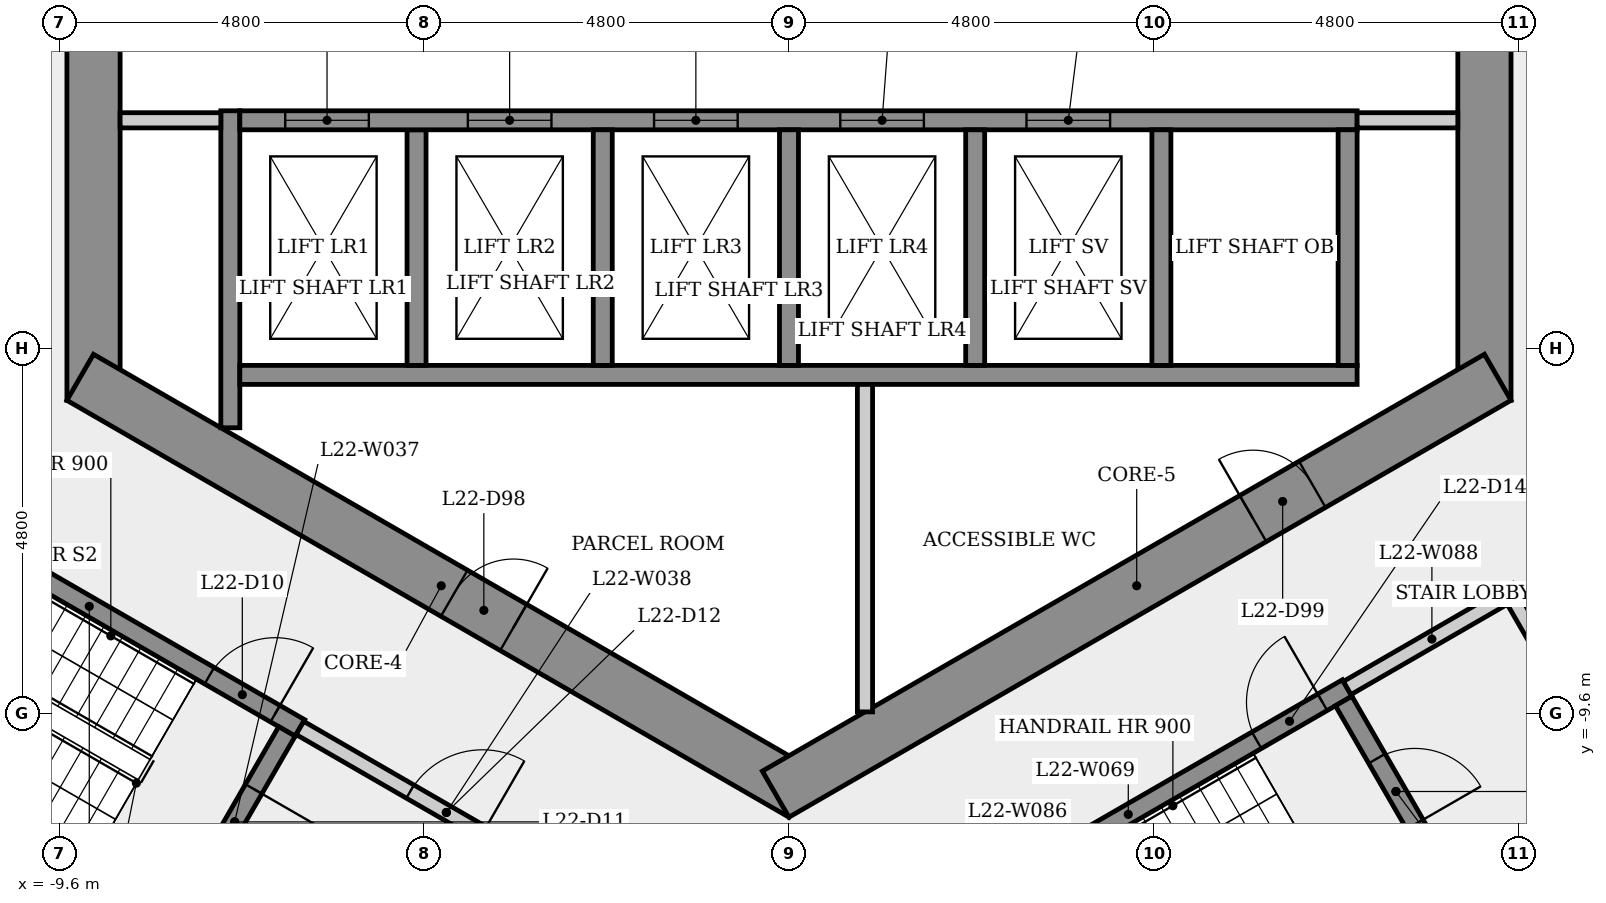
"""IFC4 building model, lengths in metres.
Left out: names, types, materials, properties, quantities, classifications, styles, units other than length and angle.
Written with IfcOpenShell. Run it as: python <this file> out.ifc"""

import sys

from ifc_helpers import new_model, si_unit, direction, frame, frame_2d, origin, place, context, subcontext, project, spatial, rectangle, extrude, element, fill, save


model = new_model("IFC4")
c1 = context("Model", 3, precision=1e-05, world=origin(), true_north=direction((0.0, 1.0)))
c2 = subcontext(c1, "Body", "Model", "MODEL_VIEW")
j1 = project(units=[si_unit("LENGTHUNIT", "METRE"), si_unit("PLANEANGLEUNIT", "RADIAN")], contexts=[c1])
p1 = place(None, origin())
s1 = spatial("IfcSite", under=j1, at=p1, CompositionType="ELEMENT")
p2 = place(p1, origin())
s2 = spatial("IfcBuilding", under=s1, at=p2, CompositionType="ELEMENT")
p3 = place(p2, frame((0.0, 0.0, 86.5)))
s3 = spatial("IfcBuildingStorey", under=s2, at=p3, CompositionType="ELEMENT", Elevation=86.5)
p4 = place(p3, frame((9.15, -5.485, 0.0), z_axis=(0.0, 0.0, 1.0), x_axis=(0.0, 1.0, 0.0)))
e1 = element("IfcWall", 1, at=p4, inside=s3, PredefinedType="SHEAR", context=c2, shape_type="SweptSolid", body=[
    extrude(rectangle(XDim=10.97, YDim=0.7, at=frame_2d((5.485, 0.0))), origin(), (0.0, 0.0, 1.0), 3.4),
])
p5 = place(p4, frame((4.685, 0.0, 0.0)))
e2 = element("IfcOpeningElement", 2, at=p5, cuts=e1, PredefinedType="OPENING", context=c2, shape_type="SweptSolid", body=[
    extrude(rectangle(XDim=1.6, YDim=2.1, at=frame_2d((0.8, 1.05))), frame((0.0, 0.36, 0.0), z_axis=(0.0, -1.0, 0.0), x_axis=(1.0, 0.0, 0.0)), (0.0, 0.0, 1.0), 0.72),
])
p6 = place(p3, frame((-9.15, 5.485, 0.0), z_axis=(0.0, 0.0, 1.0), x_axis=(0.0, -1.0, 0.0)))
e3 = element("IfcWall", 3, at=p6, inside=s3, PredefinedType="SHEAR", context=c2, shape_type="SweptSolid", body=[
    extrude(rectangle(XDim=10.97, YDim=0.7, at=frame_2d((5.485, 0.0))), origin(), (0.0, 0.0, 1.0), 3.4),
])
p7 = place(p6, frame((4.685, 0.0, 0.0)))
e4 = element("IfcOpeningElement", 4, at=p7, cuts=e3, PredefinedType="OPENING", context=c2, shape_type="SweptSolid", body=[
    extrude(rectangle(XDim=1.6, YDim=2.1, at=frame_2d((0.8, 1.05))), frame((0.0, 0.36, 0.0), z_axis=(0.0, -1.0, 0.0), x_axis=(1.0, 0.0, 0.0)), (0.0, 0.0, 1.0), 0.72),
])
p8 = place(p3, frame((-9.325, -5.182, 0.0), z_axis=(0.0, 0.0, 1.0), x_axis=(0.866023993627, -0.500002442456, 0.0)))
e5 = element("IfcWall", 5, at=p8, inside=s3, PredefinedType="SHEAR", context=c2, shape_type="SweptSolid", body=[
    extrude(rectangle(XDim=10.97, YDim=0.7, at=frame_2d((5.485, 0.0))), origin(), (0.0, 0.0, 1.0), 3.4),
])
p9 = place(p8, frame((5.682, 0.0, 0.0)))
e6 = element("IfcOpeningElement", 6, at=p9, cuts=e5, PredefinedType="OPENING", context=c2, shape_type="SweptSolid", body=[
    extrude(rectangle(XDim=0.9, YDim=2.1, at=frame_2d((0.45, 1.05))), frame((0.0, 0.36, 0.0), z_axis=(0.0, -1.0, 0.0), x_axis=(1.0, 0.0, 0.0)), (0.0, 0.0, 1.0), 0.72),
])
p10 = place(p3, frame((-0.175, -10.667, 0.0), z_axis=(0.0, 0.0, 1.0), x_axis=(0.866023993627, 0.500002442456, 0.0)))
e7 = element("IfcWall", 7, at=p10, inside=s3, PredefinedType="SHEAR", context=c2, shape_type="SweptSolid", body=[
    extrude(rectangle(XDim=10.97, YDim=0.7, at=frame_2d((5.485, 0.0))), origin(), (0.0, 0.0, 1.0), 3.4),
])
p11 = place(p10, frame((7.252, 0.0, 0.0)))
e8 = element("IfcOpeningElement", 8, at=p11, cuts=e7, PredefinedType="OPENING", context=c2, shape_type="SweptSolid", body=[
    extrude(rectangle(XDim=0.9, YDim=2.1, at=frame_2d((0.45, 1.05))), frame((0.0, 0.36, 0.0), z_axis=(0.0, -1.0, 0.0), x_axis=(1.0, 0.0, 0.0)), (0.0, 0.0, 1.0), 0.72),
])
p12 = place(p3, frame((-11.977, -6.595, 0.0), z_axis=(0.0, 0.0, 1.0), x_axis=(0.866025499775, -0.499999833739, 0.0)))
e9 = element("IfcWall", 9, at=p12, inside=s3, PredefinedType="SHEAR", context=c2, shape_type="SweptSolid", body=[
    extrude(rectangle(XDim=6.4, YDim=0.25, at=frame_2d((3.2, 0.0))), origin(), (0.0, 0.0, 1.0), 3.05),
])
p13 = place(p12, frame((5.025, 0.0, 0.0)))
e10 = element("IfcOpeningElement", 10, at=p13, cuts=e9, PredefinedType="OPENING", context=c2, shape_type="SweptSolid", body=[
    extrude(rectangle(XDim=1.0, YDim=2.1, at=frame_2d((0.5, 1.05))), frame((0.0, 0.135, 0.0), z_axis=(0.0, -1.0, 0.0), x_axis=(1.0, 0.0, 0.0)), (0.0, 0.0, 1.0), 0.27),
])
p14 = place(p3, frame((-7.935, -12.393, 0.0), z_axis=(0.0, 0.0, 1.0), x_axis=(-0.866025499775, 0.499999833739, 0.0)))
e11 = element("IfcWall", 11, at=p14, inside=s3, PredefinedType="SHEAR", context=c2, shape_type="SweptSolid", body=[
    extrude(rectangle(XDim=6.4, YDim=0.25, at=frame_2d((3.2, 0.0))), origin(), (0.0, 0.0, 1.0), 3.05),
])
p15 = place(p3, frame((-7.35, -5.846, 0.0), z_axis=(0.0, 0.0, 1.0), x_axis=(0.0, 1.0, 0.0)))
e12 = element("IfcWall", 12, at=p15, inside=s3, PredefinedType="SHEAR", context=c2, shape_type="SweptSolid", body=[
    extrude(rectangle(XDim=4.171, YDim=0.25, at=frame_2d((2.085, 0.0))), origin(), (0.0, 0.0, 1.0), 3.05),
])
p16 = place(p3, frame((-7.475, -1.8, 0.0), z_axis=(0.0, 0.0, 1.0), x_axis=(-1.0, 0.0, 0.0)))
e13 = element("IfcWall", 13, at=p16, inside=s3, PredefinedType="PARTITIONING", context=c2, shape_type="SweptSolid", body=[
    extrude(rectangle(XDim=1.325, YDim=0.2, at=frame_2d((0.663, 0.0))), origin(), (0.0, 0.0, 1.0), 3.05),
])
p17 = place(p3, frame((-6.605, -9.841, 0.0), z_axis=(0.0, 0.0, 1.0), x_axis=(-0.499996545922, -0.866027397988, 0.0)))
e14 = element("IfcWall", 14, at=p17, inside=s3, PredefinedType="SHEAR", context=c2, shape_type="SweptSolid", body=[
    extrude(rectangle(XDim=2.75, YDim=0.25, at=frame_2d((1.375, 0.0))), origin(), (0.0, 0.0, 1.0), 3.05),
])
p18 = place(p17, frame((0.875, 0.0, 0.0)))
e15 = element("IfcOpeningElement", 15, at=p18, cuts=e14, PredefinedType="OPENING", context=c2, shape_type="SweptSolid", body=[
    extrude(rectangle(XDim=1.0, YDim=2.1, at=frame_2d((0.5, 1.05))), frame((0.0, 0.135, 0.0), z_axis=(0.0, -1.0, 0.0), x_axis=(1.0, 0.0, 0.0)), (0.0, 0.0, 1.0), 0.27),
])
p19 = place(p3, frame((-6.435, -9.795, 0.0), z_axis=(0.0, 0.0, 1.0), x_axis=(0.866012907634, -0.500021643343, 0.0)))
e16 = element("IfcWall", 16, at=p19, inside=s3, PredefinedType="PARTITIONING", context=c2, shape_type="SweptSolid", body=[
    extrude(rectangle(XDim=4.45, YDim=0.2, at=frame_2d((2.225, 0.0))), origin(), (0.0, 0.0, 1.0), 3.05),
])
p20 = place(p19, frame((1.675, 0.0, 0.0)))
e17 = element("IfcOpeningElement", 17, at=p20, cuts=e16, PredefinedType="OPENING", context=c2, shape_type="SweptSolid", body=[
    extrude(rectangle(XDim=1.1, YDim=2.1, at=frame_2d((0.55, 1.05))), frame((0.0, 0.11, 0.0), z_axis=(0.0, -1.0, 0.0), x_axis=(1.0, 0.0, 0.0)), (0.0, 0.0, 1.0), 0.22),
])
p21 = place(p3, frame((-7.225, -5.15, 0.0), z_axis=(0.0, 0.0, 1.0), x_axis=(1.0, 0.0, 0.0)))
e18 = element("IfcWall", 18, at=p21, inside=s3, PredefinedType="SHEAR", context=c2, shape_type="SweptSolid", body=[
    extrude(rectangle(XDim=14.7, YDim=0.25, at=frame_2d((7.35, 0.0))), origin(), (0.0, 0.0, 1.0), 3.05),
])
p22 = place(p3, frame((-4.9, -1.925, 0.0), z_axis=(0.0, 0.0, 1.0), x_axis=(0.0, -1.0, 0.0)))
e19 = element("IfcWall", 19, at=p22, inside=s3, PredefinedType="SHEAR", context=c2, shape_type="SweptSolid", body=[
    extrude(rectangle(XDim=3.1, YDim=0.25, at=frame_2d((1.55, 0.0))), origin(), (0.0, 0.0, 1.0), 3.4),
])
p23 = place(p3, frame((-7.225, -1.8, 0.0), z_axis=(0.0, 0.0, 1.0), x_axis=(1.0, 0.0, 0.0)))
e20 = element("IfcWall", 20, at=p23, inside=s3, PredefinedType="SHEAR", context=c2, shape_type="SweptSolid", body=[
    extrude(rectangle(XDim=14.7, YDim=0.25, at=frame_2d((7.35, 0.0))), origin(), (0.0, 0.0, 1.0), 3.05),
])
p24 = place(p23, frame((0.597, 0.0, 0.0)))
e21 = element("IfcOpeningElement", 21, at=p24, cuts=e20, PredefinedType="OPENING", context=c2, shape_type="SweptSolid", body=[
    extrude(rectangle(XDim=1.1, YDim=2.1, at=frame_2d((0.55, 1.05))), frame((0.0, 0.135, 0.0), z_axis=(0.0, -1.0, 0.0), x_axis=(1.0, 0.0, 0.0)), (0.0, 0.0, 1.0), 0.27),
])
p25 = place(p23, frame((3.0, 0.0, 0.0)))
e22 = element("IfcOpeningElement", 22, at=p25, cuts=e20, PredefinedType="OPENING", context=c2, shape_type="SweptSolid", body=[
    extrude(rectangle(XDim=1.1, YDim=2.1, at=frame_2d((0.55, 1.05))), frame((0.0, 0.135, 0.0), z_axis=(0.0, -1.0, 0.0), x_axis=(1.0, 0.0, 0.0)), (0.0, 0.0, 1.0), 0.27),
])
p26 = place(p23, frame((5.45, 0.0, 0.0)))
e23 = element("IfcOpeningElement", 23, at=p26, cuts=e20, PredefinedType="OPENING", context=c2, shape_type="SweptSolid", body=[
    extrude(rectangle(XDim=1.1, YDim=2.1, at=frame_2d((0.55, 1.05))), frame((0.0, 0.135, 0.0), z_axis=(0.0, -1.0, 0.0), x_axis=(1.0, 0.0, 0.0)), (0.0, 0.0, 1.0), 0.27),
])
p27 = place(p23, frame((7.9, 0.0, 0.0)))
e24 = element("IfcOpeningElement", 24, at=p27, cuts=e20, PredefinedType="OPENING", context=c2, shape_type="SweptSolid", body=[
    extrude(rectangle(XDim=1.1, YDim=2.1, at=frame_2d((0.55, 1.05))), frame((0.0, 0.135, 0.0), z_axis=(0.0, -1.0, 0.0), x_axis=(1.0, 0.0, 0.0)), (0.0, 0.0, 1.0), 0.27),
])
p28 = place(p23, frame((10.35, 0.0, 0.0)))
e25 = element("IfcOpeningElement", 25, at=p28, cuts=e20, PredefinedType="OPENING", context=c2, shape_type="SweptSolid", body=[
    extrude(rectangle(XDim=1.1, YDim=2.1, at=frame_2d((0.55, 1.05))), frame((0.0, 0.135, 0.0), z_axis=(0.0, -1.0, 0.0), x_axis=(1.0, 0.0, 0.0)), (0.0, 0.0, 1.0), 0.27),
])
for number, where, z_axis, x_axis in (
    (26, (-2.45, -1.925, 0.0), (0.0, 0.0, 1.0), (0.0, -1.0, 0.0)),
    (27, (0.0, -1.925, 0.0), (0.0, 0.0, 1.0), (0.0, -1.0, 0.0)),
):
    element("IfcWall", number, at=place(p3, frame(where, z_axis=z_axis, x_axis=x_axis)), inside=s3, PredefinedType="SHEAR", context=c2, shape_type="SweptSolid", body=[
        extrude(rectangle(XDim=3.1, YDim=0.25, at=frame_2d((1.55, 0.0))), origin(), (0.0, 0.0, 1.0), 3.4),
    ])
p29 = place(p3, frame((1.0, -5.275, 0.0), z_axis=(0.0, 0.0, 1.0), x_axis=(0.0, -1.0, 0.0)))
e28 = element("IfcWall", 28, at=p29, inside=s3, PredefinedType="PARTITIONING", context=c2, shape_type="SweptSolid", body=[
    extrude(rectangle(XDim=4.309, YDim=0.2, at=frame_2d((2.155, 0.0))), origin(), (0.0, 0.0, 1.0), 3.05),
])
p30 = place(p3, frame((1.585, -12.595, 0.0), z_axis=(0.0, 0.0, 1.0), x_axis=(0.866036417653, 0.499980922934, 0.0)))
e29 = element("IfcWall", 29, at=p30, inside=s3, PredefinedType="SHEAR", context=c2, shape_type="SweptSolid", body=[
    extrude(rectangle(XDim=6.65, YDim=0.25, at=frame_2d((3.325, 0.0))), origin(), (0.0, 0.0, 1.0), 3.05),
])
p31 = place(p30, frame((5.275, 0.0, 0.0)))
e30 = element("IfcOpeningElement", 30, at=p31, cuts=e29, PredefinedType="OPENING", context=c2, shape_type="SweptSolid", body=[
    extrude(rectangle(XDim=1.0, YDim=2.1, at=frame_2d((0.5, 1.05))), frame((0.0, 0.135, 0.0), z_axis=(0.0, -1.0, 0.0), x_axis=(1.0, 0.0, 0.0)), (0.0, 0.0, 1.0), 0.27),
])
for number, where, z_axis, x_axis in (
    (31, (2.45, -1.925, 0.0), (0.0, 0.0, 1.0), (0.0, -1.0, 0.0)),
    (32, (4.9, -1.925, 0.0), (0.0, 0.0, 1.0), (0.0, -1.0, 0.0)),
):
    element("IfcWall", number, at=place(p3, frame(where, z_axis=z_axis, x_axis=x_axis)), inside=s3, PredefinedType="SHEAR", context=c2, shape_type="SweptSolid", body=[
        extrude(rectangle(XDim=3.1, YDim=0.25, at=frame_2d((1.55, 0.0))), origin(), (0.0, 0.0, 1.0), 3.4),
    ])
p32 = place(p3, frame((7.298, -9.441, 0.0), z_axis=(0.0, 0.0, 1.0), x_axis=(0.500034990121, -0.866005201286, 0.0)))
e33 = element("IfcWall", 33, at=p32, inside=s3, PredefinedType="SHEAR", context=c2, shape_type="SweptSolid", body=[
    extrude(rectangle(XDim=2.75, YDim=0.25, at=frame_2d((1.375, 0.0))), origin(), (0.0, 0.0, 1.0), 3.05),
])
p33 = place(p32, frame((0.875, 0.0, 0.0)))
e34 = element("IfcOpeningElement", 34, at=p33, cuts=e33, PredefinedType="OPENING", context=c2, shape_type="SweptSolid", body=[
    extrude(rectangle(XDim=1.0, YDim=2.1, at=frame_2d((0.5, 1.05))), frame((0.0, 0.135, 0.0), z_axis=(0.0, -1.0, 0.0), x_axis=(1.0, 0.0, 0.0)), (0.0, 0.0, 1.0), 0.27),
])
p34 = place(p3, frame((7.344, -9.27, 0.0), z_axis=(0.0, 0.0, 1.0), x_axis=(0.866005588531, 0.500034319456, 0.0)))
e35 = element("IfcWall", 35, at=p34, inside=s3, PredefinedType="PARTITIONING", context=c2, shape_type="SweptSolid", body=[
    extrude(rectangle(XDim=2.575, YDim=0.2, at=frame_2d((1.288, 0.0))), origin(), (0.0, 0.0, 1.0), 3.05),
])
p35 = place(p3, frame((7.35, -1.925, 0.0), z_axis=(0.0, 0.0, 1.0), x_axis=(0.0, -1.0, 0.0)))
e36 = element("IfcWall", 36, at=p35, inside=s3, PredefinedType="SHEAR", context=c2, shape_type="SweptSolid", body=[
    extrude(rectangle(XDim=3.1, YDim=0.25, at=frame_2d((1.55, 0.0))), origin(), (0.0, 0.0, 1.0), 3.4),
])
p36 = place(p3, frame((8.8, -1.8, 0.0), z_axis=(0.0, 0.0, 1.0), x_axis=(-1.0, 0.0, 0.0)))
e37 = element("IfcWall", 37, at=p36, inside=s3, PredefinedType="PARTITIONING", context=c2, shape_type="SweptSolid", body=[
    extrude(rectangle(XDim=1.325, YDim=0.2, at=frame_2d((0.663, 0.0))), origin(), (0.0, 0.0, 1.0), 3.05),
])
p37 = place(p3, frame((9.537, -8.119, 0.0), z_axis=(0.0, 0.0, 1.0), x_axis=(0.499990139034, -0.866031096941, 0.0)))
e38 = element("IfcWall", 38, at=p37, inside=s3, PredefinedType="PARTITIONING", context=c2, shape_type="SweptSolid", body=[
    extrude(rectangle(XDim=3.0, YDim=0.2, at=frame_2d((1.5, 0.0))), origin(), (0.0, 0.0, 1.0), 3.05),
])
p38 = place(p37, frame((0.935, 0.0, 0.0)))
e39 = element("IfcOpeningElement", 39, at=p38, cuts=e38, PredefinedType="OPENING", context=c2, shape_type="SweptSolid", body=[
    extrude(rectangle(XDim=1.0, YDim=2.1, at=frame_2d((0.5, 1.05))), frame((0.0, 0.11, 0.0), z_axis=(0.0, -1.0, 0.0), x_axis=(1.0, 0.0, 0.0)), (0.0, 0.0, 1.0), 0.22),
])
p39 = place(p3, frame((10.901, -10.681, 0.0), z_axis=(0.0, 0.0, 1.0), x_axis=(-0.866007538022, -0.500030943131, 0.0)))
e40 = element("IfcWall", 40, at=p39, inside=s3, PredefinedType="PARTITIONING", context=c2, shape_type="SweptSolid", body=[
    extrude(rectangle(XDim=2.375, YDim=0.2, at=frame_2d((1.188, 0.0))), origin(), (0.0, 0.0, 1.0), 3.05),
])
p40 = place(p24, origin())
e41 = element("IfcDoor", 41, at=p40, inside=s3, OperationType="SLIDING_TO_LEFT", PredefinedType="DOOR", context=c2, shape_type="SweptSolid", body=[
    extrude(rectangle(XDim=1.1, YDim=2.1, at=frame_2d((0.55, 1.05))), frame((0.0, 0.025, 0.0), z_axis=(0.0, -1.0, 0.0), x_axis=(1.0, 0.0, 0.0)), (0.0, 0.0, 1.0), 0.05),
])
fill(e21, e41)
p41 = place(p25, origin())
e42 = element("IfcDoor", 42, at=p41, inside=s3, OperationType="SLIDING_TO_LEFT", PredefinedType="DOOR", context=c2, shape_type="SweptSolid", body=[
    extrude(rectangle(XDim=1.1, YDim=2.1, at=frame_2d((0.55, 1.05))), frame((0.0, 0.025, 0.0), z_axis=(0.0, -1.0, 0.0), x_axis=(1.0, 0.0, 0.0)), (0.0, 0.0, 1.0), 0.05),
])
fill(e22, e42)
p42 = place(p26, origin())
e43 = element("IfcDoor", 43, at=p42, inside=s3, OperationType="SLIDING_TO_LEFT", PredefinedType="DOOR", context=c2, shape_type="SweptSolid", body=[
    extrude(rectangle(XDim=1.1, YDim=2.1, at=frame_2d((0.55, 1.05))), frame((0.0, 0.025, 0.0), z_axis=(0.0, -1.0, 0.0), x_axis=(1.0, 0.0, 0.0)), (0.0, 0.0, 1.0), 0.05),
])
fill(e23, e43)
p43 = place(p27, origin())
e44 = element("IfcDoor", 44, at=p43, inside=s3, OperationType="SLIDING_TO_LEFT", PredefinedType="DOOR", context=c2, shape_type="SweptSolid", body=[
    extrude(rectangle(XDim=1.1, YDim=2.1, at=frame_2d((0.55, 1.05))), frame((0.0, 0.025, 0.0), z_axis=(0.0, -1.0, 0.0), x_axis=(1.0, 0.0, 0.0)), (0.0, 0.0, 1.0), 0.05),
])
fill(e24, e44)
p44 = place(p28, origin())
e45 = element("IfcDoor", 45, at=p44, inside=s3, OperationType="SLIDING_TO_LEFT", PredefinedType="DOOR", context=c2, shape_type="SweptSolid", body=[
    extrude(rectangle(XDim=1.1, YDim=2.1, at=frame_2d((0.55, 1.05))), frame((0.0, 0.025, 0.0), z_axis=(0.0, -1.0, 0.0), x_axis=(1.0, 0.0, 0.0)), (0.0, 0.0, 1.0), 0.05),
])
fill(e25, e45)
p45 = place(p13, origin())
e46 = element("IfcDoor", 46, at=p45, inside=s3, OperationType="SINGLE_SWING_RIGHT", PredefinedType="DOOR", context=c2, shape_type="SweptSolid", body=[
    extrude(rectangle(XDim=1.0, YDim=2.1, at=frame_2d((0.5, 1.05))), frame((0.0, 0.025, 0.0), z_axis=(0.0, -1.0, 0.0), x_axis=(1.0, 0.0, 0.0)), (0.0, 0.0, 1.0), 0.05),
])
fill(e10, e46)
p46 = place(p18, origin())
e47 = element("IfcDoor", 47, at=p46, inside=s3, OperationType="SINGLE_SWING_LEFT", PredefinedType="DOOR", context=c2, shape_type="SweptSolid", body=[
    extrude(rectangle(XDim=1.0, YDim=2.1, at=frame_2d((0.5, 1.05))), frame((0.0, 0.025, 0.0), z_axis=(0.0, -1.0, 0.0), x_axis=(1.0, 0.0, 0.0)), (0.0, 0.0, 1.0), 0.05),
])
fill(e15, e47)
p47 = place(p20, origin())
e48 = element("IfcDoor", 48, at=p47, inside=s3, OperationType="SINGLE_SWING_RIGHT", PredefinedType="DOOR", context=c2, shape_type="SweptSolid", body=[
    extrude(rectangle(XDim=1.1, YDim=2.1, at=frame_2d((0.55, 1.05))), frame((0.0, 0.025, 0.0), z_axis=(0.0, -1.0, 0.0), x_axis=(1.0, 0.0, 0.0)), (0.0, 0.0, 1.0), 0.05),
])
fill(e17, e48)
p48 = place(p31, origin())
e49 = element("IfcDoor", 49, at=p48, inside=s3, OperationType="SINGLE_SWING_RIGHT", PredefinedType="DOOR", context=c2, shape_type="SweptSolid", body=[
    extrude(rectangle(XDim=1.0, YDim=2.1, at=frame_2d((0.5, 1.05))), frame((0.0, 0.025, 0.0), z_axis=(0.0, -1.0, 0.0), x_axis=(1.0, 0.0, 0.0)), (0.0, 0.0, 1.0), 0.05),
])
fill(e30, e49)
p49 = place(p33, origin())
e50 = element("IfcDoor", 50, at=p49, inside=s3, OperationType="SINGLE_SWING_RIGHT", PredefinedType="DOOR", context=c2, shape_type="SweptSolid", body=[
    extrude(rectangle(XDim=1.0, YDim=2.1, at=frame_2d((0.5, 1.05))), frame((0.0, 0.025, 0.0), z_axis=(0.0, -1.0, 0.0), x_axis=(1.0, 0.0, 0.0)), (0.0, 0.0, 1.0), 0.05),
])
fill(e34, e50)
p50 = place(p9, origin())
e51 = element("IfcDoor", 51, at=p50, inside=s3, OperationType="SINGLE_SWING_RIGHT", PredefinedType="DOOR", context=c2, shape_type="SweptSolid", body=[
    extrude(rectangle(XDim=0.9, YDim=2.1, at=frame_2d((0.45, 1.05))), frame((0.0, 0.025, 0.0), z_axis=(0.0, -1.0, 0.0), x_axis=(1.0, 0.0, 0.0)), (0.0, 0.0, 1.0), 0.05),
])
fill(e6, e51)
p51 = place(p11, origin())
e52 = element("IfcDoor", 52, at=p51, inside=s3, OperationType="SINGLE_SWING_LEFT", PredefinedType="DOOR", context=c2, shape_type="SweptSolid", body=[
    extrude(rectangle(XDim=0.9, YDim=2.1, at=frame_2d((0.45, 1.05))), frame((0.0, 0.025, 0.0), z_axis=(0.0, -1.0, 0.0), x_axis=(1.0, 0.0, 0.0)), (0.0, 0.0, 1.0), 0.05),
])
fill(e8, e52)
save(model, sys.argv[1])
